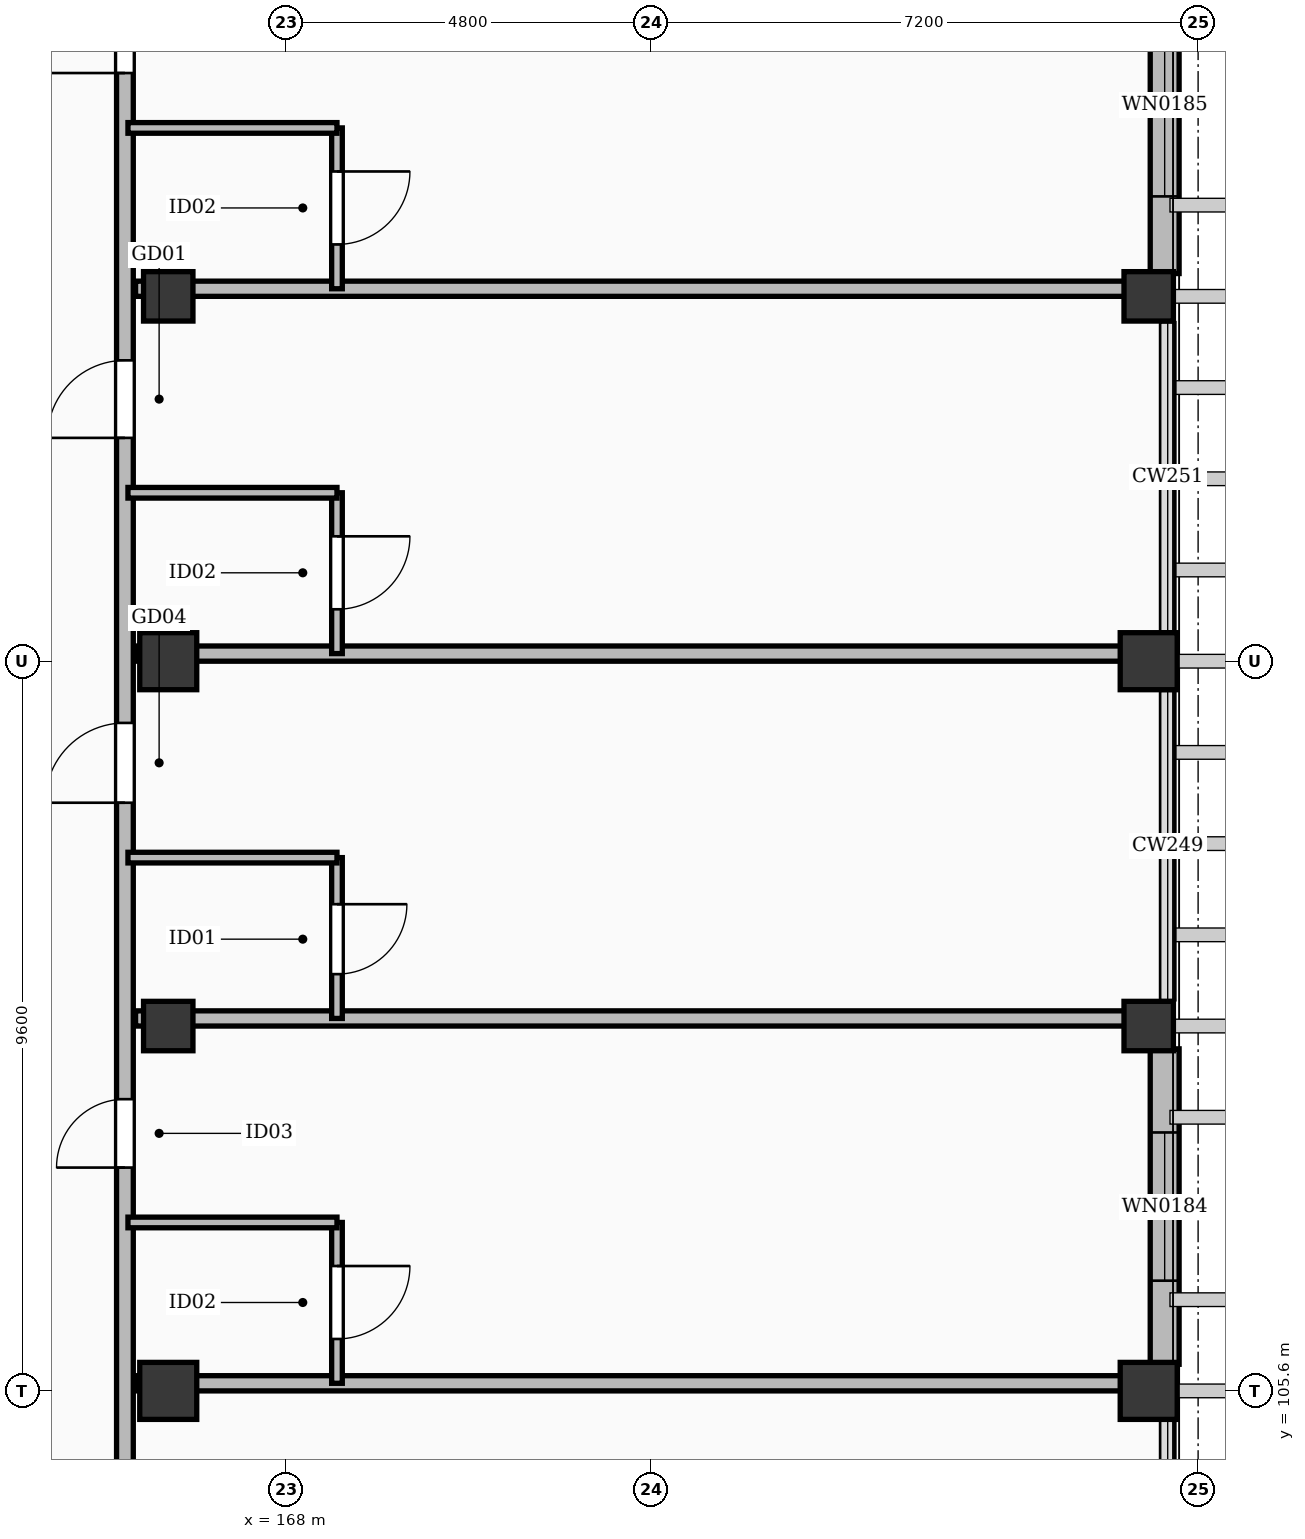
"""IFC4 building model, lengths in metres.
Left out: names, types, materials, properties, quantities, classifications, styles, units other than length and angle.
Written with IfcOpenShell. Run it as: python <this file> out.ifc"""

import sys

from ifc_helpers import new_model, si_unit, direction, frame, frame_2d, origin, origin_2d, place, context, subcontext, project, spatial, rectangle, extrude, element, fill, save


model = new_model("IFC4")
c1 = context("Model", 3, precision=1e-05, world=origin(), true_north=direction((0.0, 1.0)))
c2 = subcontext(c1, "Body", "Model", "MODEL_VIEW")
j1 = project(units=[si_unit("LENGTHUNIT", "METRE"), si_unit("PLANEANGLEUNIT", "RADIAN")], contexts=[c1])
p1 = place(None, origin())
s1 = spatial("IfcSite", under=j1, at=p1, CompositionType="ELEMENT")
p2 = place(p1, origin())
s2 = spatial("IfcBuilding", under=s1, at=p2, CompositionType="ELEMENT")
p3 = place(p2, frame((0.0, 0.0, 28.2)))
s3 = spatial("IfcBuildingStorey", under=s2, at=p3, CompositionType="ELEMENT", Elevation=28.2)
for number, where, z_axis, x_axis in (
    (1, (166.45, 105.6, 0.0), (0.0, 0.0, 1.0), (1.0, 0.0, 0.0)),
    (2, (166.45, 115.2, 0.0), (0.0, 0.0, 1.0), (1.0, 0.0, 0.0)),
    (3, (179.35, 105.6, 0.0), (0.0, 0.0, 1.0), (1.0, 0.0, 0.0)),
    (4, (179.35, 115.2, 0.0), (0.0, 0.0, 1.0), (1.0, 0.0, 0.0)),
):
    element("IfcColumn", number, at=place(p3, frame(where, z_axis=z_axis, x_axis=x_axis)), inside=s3, PredefinedType="COLUMN", context=c2, shape_type="SweptSolid", body=[
        extrude(rectangle(XDim=0.75, YDim=0.75, at=origin_2d()), origin(), (0.0, 0.0, 1.0), 3.6),
    ])
for number, where, z_axis, x_axis in (
    (5, (166.45, 110.4, 0.0), (0.0, 0.0, 1.0), (1.0, 0.0, 0.0)),
    (6, (166.45, 120.0, 0.0), (0.0, 0.0, 1.0), (1.0, 0.0, 0.0)),
    (7, (179.35, 110.4, 0.0), (0.0, 0.0, 1.0), (1.0, 0.0, 0.0)),
    (8, (179.35, 120.0, 0.0), (0.0, 0.0, 1.0), (1.0, 0.0, 0.0)),
):
    element("IfcColumn", number, at=place(p3, frame(where, z_axis=z_axis, x_axis=x_axis)), inside=s3, PredefinedType="COLUMN", context=c2, shape_type="SweptSolid", body=[
        extrude(rectangle(XDim=0.65, YDim=0.65, at=origin_2d()), origin(), (0.0, 0.0, 1.0), 3.6),
    ])
p4 = place(p3, frame((179.56, 110.1, 0.0), z_axis=(0.0, 0.0, 1.0), x_axis=(0.0, -1.0, 0.0)))
e9 = element("IfcWall", 9, at=p4, inside=s3, PredefinedType="SOLIDWALL", context=c2, shape_type="SweptSolid", body=[
    extrude(rectangle(XDim=4.15, YDim=0.38, at=frame_2d((2.075, 0.0))), origin(), (0.0, 0.0, 1.0), 2.582),
])
p5 = place(p4, frame((1.1, 0.0, 0.55)))
e10 = element("IfcOpeningElement", 10, at=p5, cuts=e9, PredefinedType="OPENING", context=c2, shape_type="SweptSolid", body=[
    extrude(rectangle(XDim=1.95, YDim=1.77, at=frame_2d((0.975, 0.885))), frame((0.0, 0.202, 0.0), z_axis=(0.0, -1.0, 0.0), x_axis=(1.0, 0.0, 0.0)), (0.0, 0.0, 1.0), 0.404),
])
p6 = place(p3, frame((179.56, 124.9, 0.0), z_axis=(0.0, 0.0, 1.0), x_axis=(0.0, -1.0, 0.0)))
e11 = element("IfcWall", 11, at=p6, inside=s3, PredefinedType="SOLIDWALL", context=c2, shape_type="SweptSolid", body=[
    extrude(rectangle(XDim=4.6, YDim=0.38, at=frame_2d((2.3, 0.0))), origin(), (0.0, 0.0, 1.0), 2.582),
])
p7 = place(p6, frame((1.185, 0.0, 0.55)))
e12 = element("IfcOpeningElement", 12, at=p7, cuts=e11, PredefinedType="OPENING", context=c2, shape_type="SweptSolid", body=[
    extrude(rectangle(XDim=2.4, YDim=1.8, at=frame_2d((1.2, 0.9))), frame((0.0, 0.202, 0.0), z_axis=(0.0, -1.0, 0.0), x_axis=(1.0, 0.0, 0.0)), (0.0, 0.0, 1.0), 0.404),
])
p8 = place(p3, frame((165.88, 38.75, 0.0), z_axis=(0.0, 0.0, 1.0), x_axis=(0.0, 1.0, 0.0)))
e13 = element("IfcWall", 13, at=p8, inside=s3, PredefinedType="PARTITIONING", context=c2, shape_type="SweptSolid", body=[
    extrude(rectangle(XDim=86.9, YDim=0.22, at=frame_2d((43.45, 0.0))), origin(), (0.0, 0.0, 1.0), 2.582),
])
p9 = place(p8, frame((0.691, 0.0, 0.0)))
e14 = element("IfcOpeningElement", 14, at=p9, cuts=e13, PredefinedType="OPENING", context=c2, shape_type="SweptSolid", body=[
    extrude(rectangle(XDim=0.98, YDim=2.15, at=frame_2d((0.49, 1.075))), frame((0.0, 0.122, 0.0), z_axis=(0.0, -1.0, 0.0), x_axis=(1.0, 0.0, 0.0)), (0.0, 0.0, 1.0), 0.244),
])
p10 = place(p8, frame((7.038, 0.0, 0.0)))
e15 = element("IfcOpeningElement", 15, at=p10, cuts=e13, PredefinedType="OPENING", context=c2, shape_type="SweptSolid", body=[
    extrude(rectangle(XDim=1.28, YDim=2.16, at=frame_2d((0.64, 1.08))), frame((0.0, 0.122, 0.0), z_axis=(0.0, -1.0, 0.0), x_axis=(1.0, 0.0, 0.0)), (0.0, 0.0, 1.0), 0.244),
])
p11 = place(p8, frame((12.188, 0.0, 0.0)))
e16 = element("IfcOpeningElement", 16, at=p11, cuts=e13, PredefinedType="OPENING", context=c2, shape_type="SweptSolid", body=[
    extrude(rectangle(XDim=0.9, YDim=2.08, at=frame_2d((0.45, 1.04))), frame((0.0, 0.122, 0.0), z_axis=(0.0, -1.0, 0.0), x_axis=(1.0, 0.0, 0.0)), (0.0, 0.0, 1.0), 0.244),
])
p12 = place(p8, frame((16.988, 0.0, 0.0)))
e17 = element("IfcOpeningElement", 17, at=p12, cuts=e13, PredefinedType="OPENING", context=c2, shape_type="SweptSolid", body=[
    extrude(rectangle(XDim=1.05, YDim=2.22, at=frame_2d((0.525, 1.11))), frame((0.0, 0.122, 0.0), z_axis=(0.0, -1.0, 0.0), x_axis=(1.0, 0.0, 0.0)), (0.0, 0.0, 1.0), 0.244),
])
p13 = place(p8, frame((21.788, 0.0, 0.0)))
e18 = element("IfcOpeningElement", 18, at=p13, cuts=e13, PredefinedType="OPENING", context=c2, shape_type="SweptSolid", body=[
    extrude(rectangle(XDim=1.02, YDim=2.2, at=frame_2d((0.51, 1.1))), frame((0.0, 0.122, 0.0), z_axis=(0.0, -1.0, 0.0), x_axis=(1.0, 0.0, 0.0)), (0.0, 0.0, 1.0), 0.244),
])
p14 = place(p8, frame((26.588, 0.0, 0.0)))
e19 = element("IfcOpeningElement", 19, at=p14, cuts=e13, PredefinedType="OPENING", context=c2, shape_type="SweptSolid", body=[
    extrude(rectangle(XDim=1.14, YDim=2.26, at=frame_2d((0.57, 1.13))), frame((0.0, 0.122, 0.0), z_axis=(0.0, -1.0, 0.0), x_axis=(1.0, 0.0, 0.0)), (0.0, 0.0, 1.0), 0.244),
])
p15 = place(p8, frame((31.388, 0.0, 0.0)))
e20 = element("IfcOpeningElement", 20, at=p15, cuts=e13, PredefinedType="OPENING", context=c2, shape_type="SweptSolid", body=[
    extrude(rectangle(XDim=0.98, YDim=2.15, at=frame_2d((0.49, 1.075))), frame((0.0, 0.122, 0.0), z_axis=(0.0, -1.0, 0.0), x_axis=(1.0, 0.0, 0.0)), (0.0, 0.0, 1.0), 0.244),
])
p16 = place(p8, frame((35.838, 0.0, 0.0)))
e21 = element("IfcOpeningElement", 21, at=p16, cuts=e13, PredefinedType="OPENING", context=c2, shape_type="SweptSolid", body=[
    extrude(rectangle(XDim=1.28, YDim=2.16, at=frame_2d((0.64, 1.08))), frame((0.0, 0.122, 0.0), z_axis=(0.0, -1.0, 0.0), x_axis=(1.0, 0.0, 0.0)), (0.0, 0.0, 1.0), 0.244),
])
p17 = place(p8, frame((40.988, 0.0, 0.0)))
e22 = element("IfcOpeningElement", 22, at=p17, cuts=e13, PredefinedType="OPENING", context=c2, shape_type="SweptSolid", body=[
    extrude(rectangle(XDim=0.9, YDim=2.08, at=frame_2d((0.45, 1.04))), frame((0.0, 0.122, 0.0), z_axis=(0.0, -1.0, 0.0), x_axis=(1.0, 0.0, 0.0)), (0.0, 0.0, 1.0), 0.244),
])
p18 = place(p8, frame((45.788, 0.0, 0.0)))
e23 = element("IfcOpeningElement", 23, at=p18, cuts=e13, PredefinedType="OPENING", context=c2, shape_type="SweptSolid", body=[
    extrude(rectangle(XDim=1.05, YDim=2.22, at=frame_2d((0.525, 1.11))), frame((0.0, 0.122, 0.0), z_axis=(0.0, -1.0, 0.0), x_axis=(1.0, 0.0, 0.0)), (0.0, 0.0, 1.0), 0.244),
])
p19 = place(p8, frame((50.588, 0.0, 0.0)))
e24 = element("IfcOpeningElement", 24, at=p19, cuts=e13, PredefinedType="OPENING", context=c2, shape_type="SweptSolid", body=[
    extrude(rectangle(XDim=1.02, YDim=2.2, at=frame_2d((0.51, 1.1))), frame((0.0, 0.122, 0.0), z_axis=(0.0, -1.0, 0.0), x_axis=(1.0, 0.0, 0.0)), (0.0, 0.0, 1.0), 0.244),
])
p20 = place(p8, frame((55.388, 0.0, 0.0)))
e25 = element("IfcOpeningElement", 25, at=p20, cuts=e13, PredefinedType="OPENING", context=c2, shape_type="SweptSolid", body=[
    extrude(rectangle(XDim=1.14, YDim=2.26, at=frame_2d((0.57, 1.13))), frame((0.0, 0.122, 0.0), z_axis=(0.0, -1.0, 0.0), x_axis=(1.0, 0.0, 0.0)), (0.0, 0.0, 1.0), 0.244),
])
p21 = place(p8, frame((60.188, 0.0, 0.0)))
e26 = element("IfcOpeningElement", 26, at=p21, cuts=e13, PredefinedType="OPENING", context=c2, shape_type="SweptSolid", body=[
    extrude(rectangle(XDim=0.98, YDim=2.15, at=frame_2d((0.49, 1.075))), frame((0.0, 0.122, 0.0), z_axis=(0.0, -1.0, 0.0), x_axis=(1.0, 0.0, 0.0)), (0.0, 0.0, 1.0), 0.244),
])
p22 = place(p8, frame((64.638, 0.0, 0.0)))
e27 = element("IfcOpeningElement", 27, at=p22, cuts=e13, PredefinedType="OPENING", context=c2, shape_type="SweptSolid", body=[
    extrude(rectangle(XDim=1.28, YDim=2.16, at=frame_2d((0.64, 1.08))), frame((0.0, 0.122, 0.0), z_axis=(0.0, -1.0, 0.0), x_axis=(1.0, 0.0, 0.0)), (0.0, 0.0, 1.0), 0.244),
])
p23 = place(p8, frame((69.788, 0.0, 0.0)))
e28 = element("IfcOpeningElement", 28, at=p23, cuts=e13, PredefinedType="OPENING", context=c2, shape_type="SweptSolid", body=[
    extrude(rectangle(XDim=0.9, YDim=2.08, at=frame_2d((0.45, 1.04))), frame((0.0, 0.122, 0.0), z_axis=(0.0, -1.0, 0.0), x_axis=(1.0, 0.0, 0.0)), (0.0, 0.0, 1.0), 0.244),
])
p24 = place(p8, frame((74.588, 0.0, 0.0)))
e29 = element("IfcOpeningElement", 29, at=p24, cuts=e13, PredefinedType="OPENING", context=c2, shape_type="SweptSolid", body=[
    extrude(rectangle(XDim=1.05, YDim=2.22, at=frame_2d((0.525, 1.11))), frame((0.0, 0.122, 0.0), z_axis=(0.0, -1.0, 0.0), x_axis=(1.0, 0.0, 0.0)), (0.0, 0.0, 1.0), 0.244),
])
p25 = place(p8, frame((79.388, 0.0, 0.0)))
e30 = element("IfcOpeningElement", 30, at=p25, cuts=e13, PredefinedType="OPENING", context=c2, shape_type="SweptSolid", body=[
    extrude(rectangle(XDim=1.02, YDim=2.2, at=frame_2d((0.51, 1.1))), frame((0.0, 0.122, 0.0), z_axis=(0.0, -1.0, 0.0), x_axis=(1.0, 0.0, 0.0)), (0.0, 0.0, 1.0), 0.244),
])
p26 = place(p8, frame((84.188, 0.0, 0.0)))
e31 = element("IfcOpeningElement", 31, at=p26, cuts=e13, PredefinedType="OPENING", context=c2, shape_type="SweptSolid", body=[
    extrude(rectangle(XDim=1.14, YDim=2.26, at=frame_2d((0.57, 1.13))), frame((0.0, 0.122, 0.0), z_axis=(0.0, -1.0, 0.0), x_axis=(1.0, 0.0, 0.0)), (0.0, 0.0, 1.0), 0.244),
])
p27 = place(p3, frame((166.02, 105.7, 0.0), z_axis=(0.0, 0.0, 1.0), x_axis=(1.0, 0.0, 0.0)))
e32 = element("IfcWall", 32, at=p27, inside=s3, PredefinedType="PARTITIONING", context=c2, shape_type="SweptSolid", body=[
    extrude(rectangle(XDim=13.23, YDim=0.2, at=frame_2d((6.615, 0.0))), origin(), (0.0, 0.0, 1.0), 2.582),
])
p28 = place(p3, frame((168.67, 105.7, 0.0), z_axis=(0.0, 0.0, 1.0), x_axis=(0.0, 1.0, 0.0)))
e33 = element("IfcWall", 33, at=p28, inside=s3, PredefinedType="PARTITIONING", context=c2, shape_type="SweptSolid", body=[
    extrude(rectangle(XDim=2.116, YDim=0.14, at=frame_2d((1.058, 0.0))), origin(), (0.0, 0.0, 1.0), 2.682),
])
p29 = place(p28, frame((0.583, 0.0, 0.0)))
e34 = element("IfcOpeningElement", 34, at=p29, cuts=e33, PredefinedType="OPENING", context=c2, shape_type="SweptSolid", body=[
    extrude(rectangle(XDim=0.96, YDim=2.12, at=frame_2d((0.48, 1.06))), frame((0.0, 0.082, 0.0), z_axis=(0.0, -1.0, 0.0), x_axis=(1.0, 0.0, 0.0)), (0.0, 0.0, 1.0), 0.164),
])
p30 = place(p3, frame((165.92, 107.816, 0.0), z_axis=(0.0, 0.0, 1.0), x_axis=(1.0, 0.0, 0.0)))
e35 = element("IfcWall", 35, at=p30, inside=s3, PredefinedType="PARTITIONING", context=c2, shape_type="SweptSolid", body=[
    extrude(rectangle(XDim=2.75, YDim=0.14, at=frame_2d((1.375, 0.0))), origin(), (0.0, 0.0, 1.0), 2.682),
])
p31 = place(p3, frame((166.02, 110.5, 0.0), z_axis=(0.0, 0.0, 1.0), x_axis=(1.0, 0.0, 0.0)))
e36 = element("IfcWall", 36, at=p31, inside=s3, PredefinedType="PARTITIONING", context=c2, shape_type="SweptSolid", body=[
    extrude(rectangle(XDim=13.23, YDim=0.2, at=frame_2d((6.615, 0.0))), origin(), (0.0, 0.0, 1.0), 2.582),
])
p32 = place(p3, frame((168.67, 110.5, 0.0), z_axis=(0.0, 0.0, 1.0), x_axis=(0.0, 1.0, 0.0)))
e37 = element("IfcWall", 37, at=p32, inside=s3, PredefinedType="PARTITIONING", context=c2, shape_type="SweptSolid", body=[
    extrude(rectangle(XDim=2.116, YDim=0.14, at=frame_2d((1.058, 0.0))), origin(), (0.0, 0.0, 1.0), 2.682),
])
p33 = place(p32, frame((0.583, 0.0, 0.0)))
e38 = element("IfcOpeningElement", 38, at=p33, cuts=e37, PredefinedType="OPENING", context=c2, shape_type="SweptSolid", body=[
    extrude(rectangle(XDim=0.92, YDim=2.1, at=frame_2d((0.46, 1.05))), frame((0.0, 0.082, 0.0), z_axis=(0.0, -1.0, 0.0), x_axis=(1.0, 0.0, 0.0)), (0.0, 0.0, 1.0), 0.164),
])
p34 = place(p3, frame((165.92, 112.616, 0.0), z_axis=(0.0, 0.0, 1.0), x_axis=(1.0, 0.0, 0.0)))
e39 = element("IfcWall", 39, at=p34, inside=s3, PredefinedType="PARTITIONING", context=c2, shape_type="SweptSolid", body=[
    extrude(rectangle(XDim=2.75, YDim=0.14, at=frame_2d((1.375, 0.0))), origin(), (0.0, 0.0, 1.0), 2.682),
])
p35 = place(p3, frame((166.02, 115.3, 0.0), z_axis=(0.0, 0.0, 1.0), x_axis=(1.0, 0.0, 0.0)))
e40 = element("IfcWall", 40, at=p35, inside=s3, PredefinedType="PARTITIONING", context=c2, shape_type="SweptSolid", body=[
    extrude(rectangle(XDim=13.23, YDim=0.2, at=frame_2d((6.615, 0.0))), origin(), (0.0, 0.0, 1.0), 2.582),
])
p36 = place(p3, frame((168.67, 115.3, 0.0), z_axis=(0.0, 0.0, 1.0), x_axis=(0.0, 1.0, 0.0)))
e41 = element("IfcWall", 41, at=p36, inside=s3, PredefinedType="PARTITIONING", context=c2, shape_type="SweptSolid", body=[
    extrude(rectangle(XDim=2.116, YDim=0.14, at=frame_2d((1.058, 0.0))), origin(), (0.0, 0.0, 1.0), 2.682),
])
p37 = place(p36, frame((0.583, 0.0, 0.0)))
e42 = element("IfcOpeningElement", 42, at=p37, cuts=e41, PredefinedType="OPENING", context=c2, shape_type="SweptSolid", body=[
    extrude(rectangle(XDim=0.96, YDim=2.12, at=frame_2d((0.48, 1.06))), frame((0.0, 0.082, 0.0), z_axis=(0.0, -1.0, 0.0), x_axis=(1.0, 0.0, 0.0)), (0.0, 0.0, 1.0), 0.164),
])
p38 = place(p3, frame((165.92, 117.416, 0.0), z_axis=(0.0, 0.0, 1.0), x_axis=(1.0, 0.0, 0.0)))
e43 = element("IfcWall", 43, at=p38, inside=s3, PredefinedType="PARTITIONING", context=c2, shape_type="SweptSolid", body=[
    extrude(rectangle(XDim=2.75, YDim=0.14, at=frame_2d((1.375, 0.0))), origin(), (0.0, 0.0, 1.0), 2.682),
])
p39 = place(p3, frame((166.02, 120.1, 0.0), z_axis=(0.0, 0.0, 1.0), x_axis=(1.0, 0.0, 0.0)))
e44 = element("IfcWall", 44, at=p39, inside=s3, PredefinedType="PARTITIONING", context=c2, shape_type="SweptSolid", body=[
    extrude(rectangle(XDim=13.23, YDim=0.2, at=frame_2d((6.615, 0.0))), origin(), (0.0, 0.0, 1.0), 2.582),
])
p40 = place(p3, frame((168.67, 120.1, 0.0), z_axis=(0.0, 0.0, 1.0), x_axis=(0.0, 1.0, 0.0)))
e45 = element("IfcWall", 45, at=p40, inside=s3, PredefinedType="PARTITIONING", context=c2, shape_type="SweptSolid", body=[
    extrude(rectangle(XDim=2.116, YDim=0.14, at=frame_2d((1.058, 0.0))), origin(), (0.0, 0.0, 1.0), 2.682),
])
p41 = place(p40, frame((0.583, 0.0, 0.0)))
e46 = element("IfcOpeningElement", 46, at=p41, cuts=e45, PredefinedType="OPENING", context=c2, shape_type="SweptSolid", body=[
    extrude(rectangle(XDim=0.96, YDim=2.12, at=frame_2d((0.48, 1.06))), frame((0.0, 0.082, 0.0), z_axis=(0.0, -1.0, 0.0), x_axis=(1.0, 0.0, 0.0)), (0.0, 0.0, 1.0), 0.164),
])
p42 = place(p3, frame((165.92, 122.216, 0.0), z_axis=(0.0, 0.0, 1.0), x_axis=(1.0, 0.0, 0.0)))
e47 = element("IfcWall", 47, at=p42, inside=s3, PredefinedType="PARTITIONING", context=c2, shape_type="SweptSolid", body=[
    extrude(rectangle(XDim=2.75, YDim=0.14, at=frame_2d((1.375, 0.0))), origin(), (0.0, 0.0, 1.0), 2.682),
])
p43 = place(p5, origin())
e48 = element("IfcWindow", 48, at=p43, inside=s3, PartitioningType="SINGLE_PANEL", PredefinedType="WINDOW", context=c2, shape_type="SweptSolid", body=[
    extrude(rectangle(XDim=1.95, YDim=1.77, at=frame_2d((0.975, 0.885))), frame((0.0, 0.03, 0.0), z_axis=(0.0, -1.0, 0.0), x_axis=(1.0, 0.0, 0.0)), (0.0, 0.0, 1.0), 0.06),
])
fill(e10, e48)
p44 = place(p7, origin())
e49 = element("IfcWindow", 49, at=p44, inside=s3, PartitioningType="SINGLE_PANEL", PredefinedType="WINDOW", context=c2, shape_type="SweptSolid", body=[
    extrude(rectangle(XDim=2.4, YDim=1.8, at=frame_2d((1.2, 0.9))), frame((0.0, 0.03, 0.0), z_axis=(0.0, -1.0, 0.0), x_axis=(1.0, 0.0, 0.0)), (0.0, 0.0, 1.0), 0.06),
])
fill(e12, e49)
p45 = place(p23, origin())
e50 = element("IfcDoor", 50, at=p45, inside=s3, OperationType="SINGLE_SWING_LEFT", PredefinedType="DOOR", context=c2, shape_type="SweptSolid", body=[
    extrude(rectangle(XDim=0.9, YDim=2.08, at=frame_2d((0.45, 1.04))), frame((0.0, 0.025, 0.0), z_axis=(0.0, -1.0, 0.0), x_axis=(1.0, 0.0, 0.0)), (0.0, 0.0, 1.0), 0.05),
])
fill(e28, e50)
p46 = place(p29, frame((0.96, 0.0, 0.0), z_axis=(0.0, 0.0, 1.0), x_axis=(-1.0, 0.0, 0.0)))
e51 = element("IfcDoor", 51, at=p46, inside=s3, OperationType="SINGLE_SWING_RIGHT", PredefinedType="DOOR", context=c2, shape_type="SweptSolid", body=[
    extrude(rectangle(XDim=0.96, YDim=2.12, at=frame_2d((0.48, 1.06))), frame((0.0, 0.025, 0.0), z_axis=(0.0, -1.0, 0.0), x_axis=(1.0, 0.0, 0.0)), (0.0, 0.0, 1.0), 0.05),
])
fill(e34, e51)
p47 = place(p24, origin())
e52 = element("IfcDoor", 52, at=p47, inside=s3, OperationType="SINGLE_SWING_LEFT", PredefinedType="DOOR", context=c2, shape_type="SweptSolid", body=[
    extrude(rectangle(XDim=1.05, YDim=2.22, at=frame_2d((0.525, 1.11))), frame((0.0, 0.025, 0.0), z_axis=(0.0, -1.0, 0.0), x_axis=(1.0, 0.0, 0.0)), (0.0, 0.0, 1.0), 0.05),
])
fill(e29, e52)
p48 = place(p33, frame((0.92, 0.0, 0.0), z_axis=(0.0, 0.0, 1.0), x_axis=(-1.0, 0.0, 0.0)))
e53 = element("IfcDoor", 53, at=p48, inside=s3, OperationType="SINGLE_SWING_RIGHT", PredefinedType="DOOR", context=c2, shape_type="SweptSolid", body=[
    extrude(rectangle(XDim=0.92, YDim=2.1, at=frame_2d((0.46, 1.05))), frame((0.0, 0.025, 0.0), z_axis=(0.0, -1.0, 0.0), x_axis=(1.0, 0.0, 0.0)), (0.0, 0.0, 1.0), 0.05),
])
fill(e38, e53)
p49 = place(p25, origin())
e54 = element("IfcDoor", 54, at=p49, inside=s3, OperationType="SINGLE_SWING_LEFT", PredefinedType="DOOR", context=c2, shape_type="SweptSolid", body=[
    extrude(rectangle(XDim=1.02, YDim=2.2, at=frame_2d((0.51, 1.1))), frame((0.0, 0.025, 0.0), z_axis=(0.0, -1.0, 0.0), x_axis=(1.0, 0.0, 0.0)), (0.0, 0.0, 1.0), 0.05),
])
fill(e30, e54)
p50 = place(p37, frame((0.96, 0.0, 0.0), z_axis=(0.0, 0.0, 1.0), x_axis=(-1.0, 0.0, 0.0)))
e55 = element("IfcDoor", 55, at=p50, inside=s3, OperationType="SINGLE_SWING_RIGHT", PredefinedType="DOOR", context=c2, shape_type="SweptSolid", body=[
    extrude(rectangle(XDim=0.96, YDim=2.12, at=frame_2d((0.48, 1.06))), frame((0.0, 0.025, 0.0), z_axis=(0.0, -1.0, 0.0), x_axis=(1.0, 0.0, 0.0)), (0.0, 0.0, 1.0), 0.05),
])
fill(e42, e55)
p51 = place(p26, origin())
e56 = element("IfcDoor", 56, at=p51, inside=s3, OperationType="SINGLE_SWING_LEFT", PredefinedType="DOOR", context=c2, shape_type="SweptSolid", body=[
    extrude(rectangle(XDim=1.14, YDim=2.26, at=frame_2d((0.57, 1.13))), frame((0.0, 0.025, 0.0), z_axis=(0.0, -1.0, 0.0), x_axis=(1.0, 0.0, 0.0)), (0.0, 0.0, 1.0), 0.05),
])
fill(e31, e56)
p52 = place(p41, frame((0.96, 0.0, 0.0), z_axis=(0.0, 0.0, 1.0), x_axis=(-1.0, 0.0, 0.0)))
e57 = element("IfcDoor", 57, at=p52, inside=s3, OperationType="SINGLE_SWING_RIGHT", PredefinedType="DOOR", context=c2, shape_type="SweptSolid", body=[
    extrude(rectangle(XDim=0.96, YDim=2.12, at=frame_2d((0.48, 1.06))), frame((0.0, 0.025, 0.0), z_axis=(0.0, -1.0, 0.0), x_axis=(1.0, 0.0, 0.0)), (0.0, 0.0, 1.0), 0.05),
])
fill(e46, e57)
save(model, sys.argv[1])
